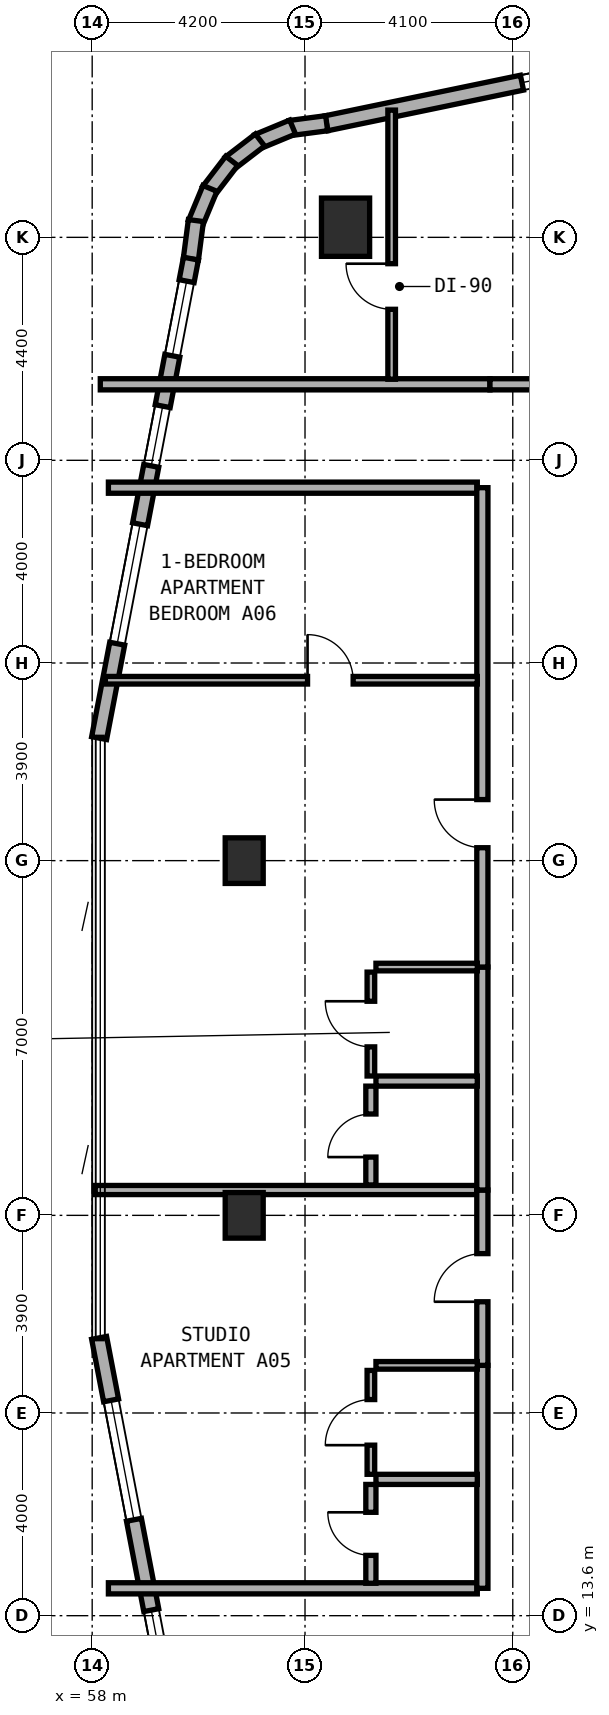
"""IFC4 building model, lengths in metres.
Left out: names, types, materials, properties, quantities, classifications, styles, units other than length and angle.
Written with IfcOpenShell. Run it as: python <this file> out.ifc"""

import sys

from ifc_helpers import new_model, si_unit, direction, frame, frame_2d, origin, origin_2d, place, context, subcontext, project, spatial, rectangle, extrude, element, fill, save


model = new_model("IFC4")
c1 = context("Model", 3, precision=1e-05, world=origin(), true_north=direction((0.0, 1.0)))
c2 = subcontext(c1, "Body", "Model", "MODEL_VIEW")
j1 = project(units=[si_unit("LENGTHUNIT", "METRE"), si_unit("PLANEANGLEUNIT", "RADIAN")], contexts=[c1])
p1 = place(None, origin())
s1 = spatial("IfcSite", under=j1, at=p1, CompositionType="ELEMENT")
p2 = place(p1, origin())
s2 = spatial("IfcBuilding", under=s1, at=p2, CompositionType="ELEMENT")
p3 = place(p2, frame((0.0, 0.0, 69.5)))
s3 = spatial("IfcBuildingStorey", under=s2, at=p3, CompositionType="ELEMENT", Elevation=69.5)
for number, where, z_axis, x_axis in (
    (1, (61.0, 21.5, 0.0), (0.0, 0.0, 1.0), (1.0, 0.0, 0.0)),
    (2, (61.0, 28.5, 0.0), (0.0, 0.0, 1.0), (1.0, 0.0, 0.0)),
):
    element("IfcColumn", number, at=place(p3, frame(where, z_axis=z_axis, x_axis=x_axis)), inside=s3, PredefinedType="COLUMN", context=c2, shape_type="SweptSolid", body=[
        extrude(rectangle(XDim=0.75, YDim=0.9, at=origin_2d()), origin(), (0.0, 0.0, 1.0), 3.5),
    ])
p4 = place(p3, frame((63.0, 41.0, 0.0), z_axis=(0.0, 0.0, 1.0), x_axis=(1.0, 0.0, 0.0)))
e3 = element("IfcColumn", 3, at=p4, inside=s3, PredefinedType="COLUMN", context=c2, shape_type="SweptSolid", body=[
    extrude(rectangle(XDim=0.95, YDim=1.15, at=origin_2d()), origin(), (0.0, 0.0, 1.0), 3.5),
])
p5 = place(p3, frame((71.326, 44.858, 0.0), z_axis=(0.0, 0.0, 1.0), x_axis=(-0.979124350489, -0.203262161453, 0.0)))
e4 = element("IfcWall", 4, at=p5, inside=s3, PredefinedType="STANDARD", context=c2, shape_type="SweptSolid", body=[
    extrude(rectangle(XDim=8.889, YDim=0.3, at=frame_2d((4.445, 0.0))), origin(), (0.0, 0.0, 1.0), 3.25),
])
p6 = place(p5, frame((2.548, 0.0, 0.8)))
e5 = element("IfcOpeningElement", 5, at=p6, cuts=e4, PredefinedType="OPENING", context=c2, shape_type="SweptSolid", body=[
    extrude(rectangle(XDim=2.4, YDim=1.6, at=frame_2d((1.2, 0.8))), frame((0.0, 0.16, 0.0), z_axis=(0.0, -1.0, 0.0), x_axis=(1.0, 0.0, 0.0)), (0.0, 0.0, 1.0), 0.32),
])
p7 = place(p3, frame((62.627, 43.052, 0.0), z_axis=(0.0, 0.0, 1.0), x_axis=(-0.991480488834, -0.130255288807, 0.0)))
e6 = element("IfcWall", 6, at=p7, inside=s3, PredefinedType="STANDARD", context=c2, shape_type="SweptSolid", body=[
    extrude(rectangle(XDim=0.729, YDim=0.3, at=frame_2d((0.365, 0.0))), origin(), (0.0, 0.0, 1.0), 3.25),
])
for number, where, z_axis, x_axis in (
    (7, (61.955, 42.976, 0.0), (0.0, 0.0, 1.0), (-0.924, -0.384, 0.0)),
    (8, (61.311, 42.721, 0.0), (0.0, 0.0, 1.0), (-0.794, -0.608, 0.0)),
    (9, (60.754, 42.309, 0.0), (0.0, 0.0, 1.0), (-0.608, -0.794, 0.0)),
    (10, (60.324, 41.766, 0.0), (0.0, 0.0, 1.0), (-0.383, -0.924, 0.0)),
):
    element("IfcWall", number, at=place(p3, frame(where, z_axis=z_axis, x_axis=x_axis)), inside=s3, PredefinedType="STANDARD", context=c2, shape_type="SweptSolid", body=[
        extrude(rectangle(XDim=0.746, YDim=0.3, at=frame_2d((0.373, 0.0))), origin(), (0.0, 0.0, 1.0), 3.25),
    ])
p8 = place(p3, frame((60.047, 41.131, 0.0), z_axis=(0.0, 0.0, 1.0), x_axis=(-0.129653178221, -0.991559404866, 0.0)))
e11 = element("IfcWall", 11, at=p8, inside=s3, PredefinedType="STANDARD", context=c2, shape_type="SweptSolid", body=[
    extrude(rectangle(XDim=0.764, YDim=0.3, at=frame_2d((0.382, 0.0))), origin(), (0.0, 0.0, 1.0), 3.25),
])
p9 = place(p3, frame((59.949, 40.38, 0.0), z_axis=(0.0, 0.0, 1.0), x_axis=(-0.188087874316, -0.982152203854, 0.0)))
e12 = element("IfcWall", 12, at=p9, inside=s3, PredefinedType="STANDARD", context=c2, shape_type="SweptSolid", body=[
    extrude(rectangle(XDim=9.634, YDim=0.3, at=frame_2d((4.817, 0.0))), origin(), (0.0, 0.0, 1.0), 3.25),
])
p10 = place(p9, frame((0.452, 0.0, 0.85)))
e13 = element("IfcOpeningElement", 13, at=p10, cuts=e12, PredefinedType="OPENING", context=c2, shape_type="SweptSolid", body=[
    extrude(rectangle(XDim=1.5, YDim=1.5, at=frame_2d((0.75, 0.75))), frame((0.0, 0.16, 0.0), z_axis=(0.0, -1.0, 0.0), x_axis=(1.0, 0.0, 0.0)), (0.0, 0.0, 1.0), 0.32),
])
p11 = place(p9, frame((2.964, 0.0, 0.85)))
e14 = element("IfcOpeningElement", 14, at=p11, cuts=e12, PredefinedType="OPENING", context=c2, shape_type="SweptSolid", body=[
    extrude(rectangle(XDim=1.2, YDim=1.5, at=frame_2d((0.6, 0.75))), frame((0.0, 0.16, 0.0), z_axis=(0.0, -1.0, 0.0), x_axis=(1.0, 0.0, 0.0)), (0.0, 0.0, 1.0), 0.32),
])
p12 = place(p9, frame((5.337, 0.0, 0.8)))
e15 = element("IfcOpeningElement", 15, at=p12, cuts=e12, PredefinedType="OPENING", context=c2, shape_type="SweptSolid", body=[
    extrude(rectangle(XDim=2.4, YDim=1.6, at=frame_2d((1.2, 0.8))), frame((0.0, 0.16, 0.0), z_axis=(0.0, -1.0, 0.0), x_axis=(1.0, 0.0, 0.0)), (0.0, 0.0, 1.0), 0.32),
])
p13 = place(p3, frame((58.137, 19.082, 0.0), z_axis=(0.0, 0.0, 1.0), x_axis=(0.188087874316, -0.982152203854, 0.0)))
e16 = element("IfcWall", 16, at=p13, inside=s3, PredefinedType="STANDARD", context=c2, shape_type="SweptSolid", body=[
    extrude(rectangle(XDim=9.634, YDim=0.3, at=frame_2d((4.817, 0.0))), origin(), (0.0, 0.0, 1.0), 3.25),
])
p14 = place(p13, frame((1.255, 0.0, 0.8)))
e17 = element("IfcOpeningElement", 17, at=p14, cuts=e16, PredefinedType="OPENING", context=c2, shape_type="SweptSolid", body=[
    extrude(rectangle(XDim=2.4, YDim=1.6, at=frame_2d((1.2, 0.8))), frame((0.0, 0.16, 0.0), z_axis=(0.0, -1.0, 0.0), x_axis=(1.0, 0.0, 0.0)), (0.0, 0.0, 1.0), 0.32),
])
p15 = place(p13, frame((5.47, 0.0, 0.85)))
e18 = element("IfcOpeningElement", 18, at=p15, cuts=e16, PredefinedType="OPENING", context=c2, shape_type="SweptSolid", body=[
    extrude(rectangle(XDim=1.2, YDim=1.5, at=frame_2d((0.6, 0.75))), frame((0.0, 0.16, 0.0), z_axis=(0.0, -1.0, 0.0), x_axis=(1.0, 0.0, 0.0)), (0.0, 0.0, 1.0), 0.32),
])
p16 = place(p13, frame((7.682, 0.0, 0.85)))
e19 = element("IfcOpeningElement", 19, at=p16, cuts=e16, PredefinedType="OPENING", context=c2, shape_type="SweptSolid", body=[
    extrude(rectangle(XDim=1.5, YDim=1.5, at=frame_2d((0.75, 0.75))), frame((0.0, 0.16, 0.0), z_axis=(0.0, -1.0, 0.0), x_axis=(1.0, 0.0, 0.0)), (0.0, 0.0, 1.0), 0.32),
])
p17 = place(p3, frame((58.16, 37.9, 0.0), z_axis=(0.0, 0.0, 1.0), x_axis=(1.0, 0.0, 0.0)))
e20 = element("IfcWall", 20, at=p17, inside=s3, PredefinedType="SOLIDWALL", context=c2, shape_type="SweptSolid", body=[
    extrude(rectangle(XDim=7.69, YDim=0.22, at=frame_2d((3.845, 0.0))), origin(), (0.0, 0.0, 1.0), 2.865),
])
p18 = place(p3, frame((65.85, 37.9, 0.0), z_axis=(0.0, 0.0, 1.0), x_axis=(1.0, 0.0, 0.0)))
e21 = element("IfcWall", 21, at=p18, inside=s3, PredefinedType="SOLIDWALL", context=c2, shape_type="SweptSolid", body=[
    extrude(rectangle(XDim=8.87, YDim=0.22, at=frame_2d((4.435, 0.0))), origin(), (0.0, 0.0, 1.0), 2.725),
])
p19 = place(p18, frame((3.96, 0.0, 0.0)))
e22 = element("IfcOpeningElement", 22, at=p19, cuts=e21, PredefinedType="OPENING", context=c2, shape_type="SweptSolid", body=[
    extrude(rectangle(XDim=0.95, YDim=2.1, at=frame_2d((0.475, 1.05))), frame((0.0, 0.12, 0.0), z_axis=(0.0, -1.0, 0.0), x_axis=(1.0, 0.0, 0.0)), (0.0, 0.0, 1.0), 0.24),
])
p20 = place(p3, frame((63.91, 38.0, 0.0), z_axis=(0.0, 0.0, 1.0), x_axis=(0.0, 1.0, 0.0)))
e23 = element("IfcWall", 23, at=p20, inside=s3, PredefinedType="PARTITIONING", context=c2, shape_type="SweptSolid", body=[
    extrude(rectangle(XDim=5.311, YDim=0.15, at=frame_2d((2.656, 0.0))), origin(), (0.0, 0.0, 1.0), 2.865),
])
p21 = place(p20, frame((1.38, 0.0, 0.0)))
e24 = element("IfcOpeningElement", 24, at=p21, cuts=e23, PredefinedType="OPENING", context=c2, shape_type="SweptSolid", body=[
    extrude(rectangle(XDim=0.9, YDim=2.1, at=frame_2d((0.45, 1.05))), frame((0.0, 0.085, 0.0), z_axis=(0.0, -1.0, 0.0), x_axis=(1.0, 0.0, 0.0)), (0.0, 0.0, 1.0), 0.17),
])
for number, where, z_axis, x_axis in (
    (25, (58.32, 14.14, 0.0), (0.0, 0.0, 1.0), (1.0, 0.0, 0.0)),
    (26, (58.32, 35.86, 0.0), (0.0, 0.0, 1.0), (1.0, 0.0, 0.0)),
):
    element("IfcWall", number, at=place(p3, frame(where, z_axis=z_axis, x_axis=x_axis)), inside=s3, PredefinedType="SOLIDWALL", context=c2, shape_type="SweptSolid", body=[
        extrude(rectangle(XDim=7.28, YDim=0.22, at=frame_2d((3.64, 0.0))), origin(), (0.0, 0.0, 1.0), 2.865),
    ])
p22 = place(p3, frame((58.06, 22.0, 0.0), z_axis=(0.0, 0.0, 1.0), x_axis=(1.0, 0.0, 0.0)))
e27 = element("IfcWall", 27, at=p22, inside=s3, PredefinedType="SOLIDWALL", context=c2, shape_type="SweptSolid", body=[
    extrude(rectangle(XDim=7.64, YDim=0.18, at=frame_2d((3.82, 0.0))), origin(), (0.0, 0.0, 1.0), 2.865),
])
p23 = place(p3, frame((65.7, 14.14, 0.0), z_axis=(0.0, 0.0, 1.0), x_axis=(0.0, 1.0, 0.0)))
e28 = element("IfcWall", 28, at=p23, inside=s3, PredefinedType="SOLIDWALL", context=c2, shape_type="SweptSolid", body=[
    extrude(rectangle(XDim=4.4, YDim=0.22, at=frame_2d((2.2, 0.0))), origin(), (0.0, 0.0, 1.0), 3.22),
])
p24 = place(p3, frame((65.7, 18.54, 0.0), z_axis=(0.0, 0.0, 1.0), x_axis=(0.0, 1.0, 0.0)))
e29 = element("IfcWall", 29, at=p24, inside=s3, PredefinedType="SOLIDWALL", context=c2, shape_type="SweptSolid", body=[
    extrude(rectangle(XDim=3.46, YDim=0.22, at=frame_2d((1.73, 0.0))), origin(), (0.0, 0.0, 1.0), 2.725),
])
p25 = place(p24, frame((1.255, 0.0, 0.0)))
e30 = element("IfcOpeningElement", 30, at=p25, cuts=e29, PredefinedType="OPENING", context=c2, shape_type="SweptSolid", body=[
    extrude(rectangle(XDim=0.95, YDim=2.1, at=frame_2d((0.475, 1.05))), frame((0.0, 0.12, 0.0), z_axis=(0.0, -1.0, 0.0), x_axis=(1.0, 0.0, 0.0)), (0.0, 0.0, 1.0), 0.24),
])
p26 = place(p3, frame((63.6, 16.29, 0.0), z_axis=(0.0, 0.0, 1.0), x_axis=(1.0, 0.0, 0.0)))
e31 = element("IfcWall", 31, at=p26, inside=s3, PredefinedType="PLUMBINGWALL", context=c2, shape_type="SweptSolid", body=[
    extrude(rectangle(XDim=2.0, YDim=0.2, at=frame_2d((1.0, 0.0))), origin(), (0.0, 0.0, 1.0), 3.22),
])
p27 = place(p3, frame((63.6, 18.54, 0.0), z_axis=(0.0, 0.0, 1.0), x_axis=(1.0, 0.0, 0.0)))
e32 = element("IfcWall", 32, at=p27, inside=s3, PredefinedType="PARTITIONING", context=c2, shape_type="SweptSolid", body=[
    extrude(rectangle(XDim=2.0, YDim=0.15, at=frame_2d((1.0, 0.0))), origin(), (0.0, 0.0, 1.0), 3.22),
])
p28 = place(p3, frame((63.5, 14.24, 0.0), z_axis=(0.0, 0.0, 1.0), x_axis=(0.0, 1.0, 0.0)))
e33 = element("IfcWall", 33, at=p28, inside=s3, PredefinedType="PLUMBINGWALL", context=c2, shape_type="SweptSolid", body=[
    extrude(rectangle(XDim=1.95, YDim=0.2, at=frame_2d((0.975, 0.0))), origin(), (0.0, 0.0, 1.0), 3.22),
])
p29 = place(p28, frame((0.55, 0.0, 0.0)))
e34 = element("IfcOpeningElement", 34, at=p29, cuts=e33, PredefinedType="OPENING", context=c2, shape_type="SweptSolid", body=[
    extrude(rectangle(XDim=0.85, YDim=2.1, at=frame_2d((0.425, 1.05))), frame((0.0, 0.11, 0.0), z_axis=(0.0, -1.0, 0.0), x_axis=(1.0, 0.0, 0.0)), (0.0, 0.0, 1.0), 0.22),
])
p30 = place(p3, frame((63.5, 16.39, 0.0), z_axis=(0.0, 0.0, 1.0), x_axis=(0.0, 1.0, 0.0)))
e35 = element("IfcWall", 35, at=p30, inside=s3, PredefinedType="PARTITIONING", context=c2, shape_type="SweptSolid", body=[
    extrude(rectangle(XDim=2.05, YDim=0.15, at=frame_2d((1.025, 0.0))), origin(), (0.0, 0.0, 1.0), 3.22),
])
p31 = place(p30, frame((0.575, 0.0, 0.0)))
e36 = element("IfcOpeningElement", 36, at=p31, cuts=e35, PredefinedType="OPENING", context=c2, shape_type="SweptSolid", body=[
    extrude(rectangle(XDim=0.9, YDim=2.1, at=frame_2d((0.45, 1.05))), frame((0.0, 0.085, 0.0), z_axis=(0.0, -1.0, 0.0), x_axis=(1.0, 0.0, 0.0)), (0.0, 0.0, 1.0), 0.17),
])
p32 = place(p3, frame((65.7, 22.0, 0.0), z_axis=(0.0, 0.0, 1.0), x_axis=(0.0, 1.0, 0.0)))
e37 = element("IfcWall", 37, at=p32, inside=s3, PredefinedType="SOLIDWALL", context=c2, shape_type="SweptSolid", body=[
    extrude(rectangle(XDim=4.4, YDim=0.22, at=frame_2d((2.2, 0.0))), origin(), (0.0, 0.0, 1.0), 3.22),
])
p33 = place(p3, frame((65.7, 26.4, 0.0), z_axis=(0.0, 0.0, 1.0), x_axis=(0.0, 1.0, 0.0)))
e38 = element("IfcWall", 38, at=p33, inside=s3, PredefinedType="SOLIDWALL", context=c2, shape_type="SweptSolid", body=[
    extrude(rectangle(XDim=9.46, YDim=0.22, at=frame_2d((4.73, 0.0))), origin(), (0.0, 0.0, 1.0), 2.725),
])
p34 = place(p33, frame((2.355, 0.0, 0.0)))
e39 = element("IfcOpeningElement", 39, at=p34, cuts=e38, PredefinedType="OPENING", context=c2, shape_type="SweptSolid", body=[
    extrude(rectangle(XDim=0.95, YDim=2.1, at=frame_2d((0.475, 1.05))), frame((0.0, 0.12, 0.0), z_axis=(0.0, -1.0, 0.0), x_axis=(1.0, 0.0, 0.0)), (0.0, 0.0, 1.0), 0.24),
])
p35 = place(p3, frame((58.26, 32.06, 0.0), z_axis=(0.0, 0.0, 1.0), x_axis=(1.0, 0.0, 0.0)))
e40 = element("IfcWall", 40, at=p35, inside=s3, PredefinedType="PARTITIONING", context=c2, shape_type="SweptSolid", body=[
    extrude(rectangle(XDim=7.34, YDim=0.15, at=frame_2d((3.67, 0.0))), origin(), (0.0, 0.0, 1.0), 2.865),
])
p36 = place(p35, frame((3.99, 0.0, 0.0)))
e41 = element("IfcOpeningElement", 41, at=p36, cuts=e40, PredefinedType="OPENING", context=c2, shape_type="SweptSolid", body=[
    extrude(rectangle(XDim=0.9, YDim=2.1, at=frame_2d((0.45, 1.05))), frame((0.0, 0.085, 0.0), z_axis=(0.0, -1.0, 0.0), x_axis=(1.0, 0.0, 0.0)), (0.0, 0.0, 1.0), 0.17),
])
p37 = place(p3, frame((63.6, 24.15, 0.0), z_axis=(0.0, 0.0, 1.0), x_axis=(1.0, 0.0, 0.0)))
e42 = element("IfcWall", 42, at=p37, inside=s3, PredefinedType="PLUMBINGWALL", context=c2, shape_type="SweptSolid", body=[
    extrude(rectangle(XDim=2.0, YDim=0.2, at=frame_2d((1.0, 0.0))), origin(), (0.0, 0.0, 1.0), 3.22),
])
p38 = place(p3, frame((63.6, 26.4, 0.0), z_axis=(0.0, 0.0, 1.0), x_axis=(1.0, 0.0, 0.0)))
e43 = element("IfcWall", 43, at=p38, inside=s3, PredefinedType="PARTITIONING", context=c2, shape_type="SweptSolid", body=[
    extrude(rectangle(XDim=2.0, YDim=0.15, at=frame_2d((1.0, 0.0))), origin(), (0.0, 0.0, 1.0), 3.22),
])
p39 = place(p3, frame((63.5, 22.1, 0.0), z_axis=(0.0, 0.0, 1.0), x_axis=(0.0, 1.0, 0.0)))
e44 = element("IfcWall", 44, at=p39, inside=s3, PredefinedType="PLUMBINGWALL", context=c2, shape_type="SweptSolid", body=[
    extrude(rectangle(XDim=1.95, YDim=0.2, at=frame_2d((0.975, 0.0))), origin(), (0.0, 0.0, 1.0), 3.22),
])
p40 = place(p39, frame((0.55, 0.0, 0.0)))
e45 = element("IfcOpeningElement", 45, at=p40, cuts=e44, PredefinedType="OPENING", context=c2, shape_type="SweptSolid", body=[
    extrude(rectangle(XDim=0.85, YDim=2.1, at=frame_2d((0.425, 1.05))), frame((0.0, 0.11, 0.0), z_axis=(0.0, -1.0, 0.0), x_axis=(1.0, 0.0, 0.0)), (0.0, 0.0, 1.0), 0.22),
])
p41 = place(p3, frame((63.5, 24.25, 0.0), z_axis=(0.0, 0.0, 1.0), x_axis=(0.0, 1.0, 0.0)))
e46 = element("IfcWall", 46, at=p41, inside=s3, PredefinedType="PARTITIONING", context=c2, shape_type="SweptSolid", body=[
    extrude(rectangle(XDim=2.05, YDim=0.15, at=frame_2d((1.025, 0.0))), origin(), (0.0, 0.0, 1.0), 3.22),
])
p42 = place(p41, frame((0.575, 0.0, 0.0)))
e47 = element("IfcOpeningElement", 47, at=p42, cuts=e46, PredefinedType="OPENING", context=c2, shape_type="SweptSolid", body=[
    extrude(rectangle(XDim=0.9, YDim=2.1, at=frame_2d((0.45, 1.05))), frame((0.0, 0.085, 0.0), z_axis=(0.0, -1.0, 0.0), x_axis=(1.0, 0.0, 0.0)), (0.0, 0.0, 1.0), 0.17),
])
p43 = place(p6, origin())
e48 = element("IfcWindow", 48, at=p43, inside=s3, PartitioningType="SINGLE_PANEL", PredefinedType="WINDOW", context=c2, shape_type="SweptSolid", body=[
    extrude(rectangle(XDim=2.4, YDim=1.6, at=frame_2d((1.2, 0.8))), frame((0.0, 0.03, 0.0), z_axis=(0.0, -1.0, 0.0), x_axis=(1.0, 0.0, 0.0)), (0.0, 0.0, 1.0), 0.06),
])
fill(e5, e48)
p44 = place(p10, origin())
e49 = element("IfcWindow", 49, at=p44, inside=s3, PartitioningType="SINGLE_PANEL", PredefinedType="WINDOW", context=c2, shape_type="SweptSolid", body=[
    extrude(rectangle(XDim=1.5, YDim=1.5, at=frame_2d((0.75, 0.75))), frame((0.0, 0.03, 0.0), z_axis=(0.0, -1.0, 0.0), x_axis=(1.0, 0.0, 0.0)), (0.0, 0.0, 1.0), 0.06),
])
fill(e13, e49)
p45 = place(p11, origin())
e50 = element("IfcWindow", 50, at=p45, inside=s3, PartitioningType="SINGLE_PANEL", PredefinedType="WINDOW", context=c2, shape_type="SweptSolid", body=[
    extrude(rectangle(XDim=1.2, YDim=1.5, at=frame_2d((0.6, 0.75))), frame((0.0, 0.03, 0.0), z_axis=(0.0, -1.0, 0.0), x_axis=(1.0, 0.0, 0.0)), (0.0, 0.0, 1.0), 0.06),
])
fill(e14, e50)
p46 = place(p12, origin())
e51 = element("IfcWindow", 51, at=p46, inside=s3, PartitioningType="SINGLE_PANEL", PredefinedType="WINDOW", context=c2, shape_type="SweptSolid", body=[
    extrude(rectangle(XDim=2.4, YDim=1.6, at=frame_2d((1.2, 0.8))), frame((0.0, 0.03, 0.0), z_axis=(0.0, -1.0, 0.0), x_axis=(1.0, 0.0, 0.0)), (0.0, 0.0, 1.0), 0.06),
])
fill(e15, e51)
p47 = place(p14, origin())
e52 = element("IfcWindow", 52, at=p47, inside=s3, PartitioningType="SINGLE_PANEL", PredefinedType="WINDOW", context=c2, shape_type="SweptSolid", body=[
    extrude(rectangle(XDim=2.4, YDim=1.6, at=frame_2d((1.2, 0.8))), frame((0.0, 0.03, 0.0), z_axis=(0.0, -1.0, 0.0), x_axis=(1.0, 0.0, 0.0)), (0.0, 0.0, 1.0), 0.06),
])
fill(e17, e52)
p48 = place(p15, origin())
e53 = element("IfcWindow", 53, at=p48, inside=s3, PartitioningType="SINGLE_PANEL", PredefinedType="WINDOW", context=c2, shape_type="SweptSolid", body=[
    extrude(rectangle(XDim=1.2, YDim=1.5, at=frame_2d((0.6, 0.75))), frame((0.0, 0.03, 0.0), z_axis=(0.0, -1.0, 0.0), x_axis=(1.0, 0.0, 0.0)), (0.0, 0.0, 1.0), 0.06),
])
fill(e18, e53)
p49 = place(p21, origin())
e54 = element("IfcDoor", 54, at=p49, inside=s3, OperationType="SINGLE_SWING_RIGHT", PredefinedType="DOOR", context=c2, shape_type="SweptSolid", body=[
    extrude(rectangle(XDim=0.9, YDim=2.1, at=frame_2d((0.45, 1.05))), frame((0.0, 0.025, 0.0), z_axis=(0.0, -1.0, 0.0), x_axis=(1.0, 0.0, 0.0)), (0.0, 0.0, 1.0), 0.05),
])
fill(e24, e54)
p50 = place(p25, origin())
e55 = element("IfcDoor", 55, at=p50, inside=s3, OperationType="SINGLE_SWING_LEFT", PredefinedType="DOOR", context=c2, shape_type="SweptSolid", body=[
    extrude(rectangle(XDim=0.95, YDim=2.1, at=frame_2d((0.475, 1.05))), frame((0.0, 0.025, 0.0), z_axis=(0.0, -1.0, 0.0), x_axis=(1.0, 0.0, 0.0)), (0.0, 0.0, 1.0), 0.05),
])
fill(e30, e55)
p51 = place(p29, origin())
e56 = element("IfcDoor", 56, at=p51, inside=s3, OperationType="SINGLE_SWING_RIGHT", PredefinedType="DOOR", context=c2, shape_type="SweptSolid", body=[
    extrude(rectangle(XDim=0.85, YDim=2.1, at=frame_2d((0.425, 1.05))), frame((0.0, 0.025, 0.0), z_axis=(0.0, -1.0, 0.0), x_axis=(1.0, 0.0, 0.0)), (0.0, 0.0, 1.0), 0.05),
])
fill(e34, e56)
p52 = place(p31, origin())
e57 = element("IfcDoor", 57, at=p52, inside=s3, OperationType="SINGLE_SWING_LEFT", PredefinedType="DOOR", context=c2, shape_type="SweptSolid", body=[
    extrude(rectangle(XDim=0.9, YDim=2.1, at=frame_2d((0.45, 1.05))), frame((0.0, 0.025, 0.0), z_axis=(0.0, -1.0, 0.0), x_axis=(1.0, 0.0, 0.0)), (0.0, 0.0, 1.0), 0.05),
])
fill(e36, e57)
p53 = place(p34, origin())
e58 = element("IfcDoor", 58, at=p53, inside=s3, OperationType="SINGLE_SWING_RIGHT", PredefinedType="DOOR", context=c2, shape_type="SweptSolid", body=[
    extrude(rectangle(XDim=0.95, YDim=2.1, at=frame_2d((0.475, 1.05))), frame((0.0, 0.025, 0.0), z_axis=(0.0, -1.0, 0.0), x_axis=(1.0, 0.0, 0.0)), (0.0, 0.0, 1.0), 0.05),
])
fill(e39, e58)
p54 = place(p36, origin())
e59 = element("IfcDoor", 59, at=p54, inside=s3, OperationType="SINGLE_SWING_LEFT", PredefinedType="DOOR", context=c2, shape_type="SweptSolid", body=[
    extrude(rectangle(XDim=0.9, YDim=2.1, at=frame_2d((0.45, 1.05))), frame((0.0, 0.025, 0.0), z_axis=(0.0, -1.0, 0.0), x_axis=(1.0, 0.0, 0.0)), (0.0, 0.0, 1.0), 0.05),
])
fill(e41, e59)
p55 = place(p40, origin())
e60 = element("IfcDoor", 60, at=p55, inside=s3, OperationType="SINGLE_SWING_LEFT", PredefinedType="DOOR", context=c2, shape_type="SweptSolid", body=[
    extrude(rectangle(XDim=0.85, YDim=2.1, at=frame_2d((0.425, 1.05))), frame((0.0, 0.025, 0.0), z_axis=(0.0, -1.0, 0.0), x_axis=(1.0, 0.0, 0.0)), (0.0, 0.0, 1.0), 0.05),
])
fill(e45, e60)
p56 = place(p42, origin())
e61 = element("IfcDoor", 61, at=p56, inside=s3, OperationType="SINGLE_SWING_RIGHT", PredefinedType="DOOR", context=c2, shape_type="SweptSolid", body=[
    extrude(rectangle(XDim=0.9, YDim=2.1, at=frame_2d((0.45, 1.05))), frame((0.0, 0.025, 0.0), z_axis=(0.0, -1.0, 0.0), x_axis=(1.0, 0.0, 0.0)), (0.0, 0.0, 1.0), 0.05),
])
fill(e47, e61)
save(model, sys.argv[1])
